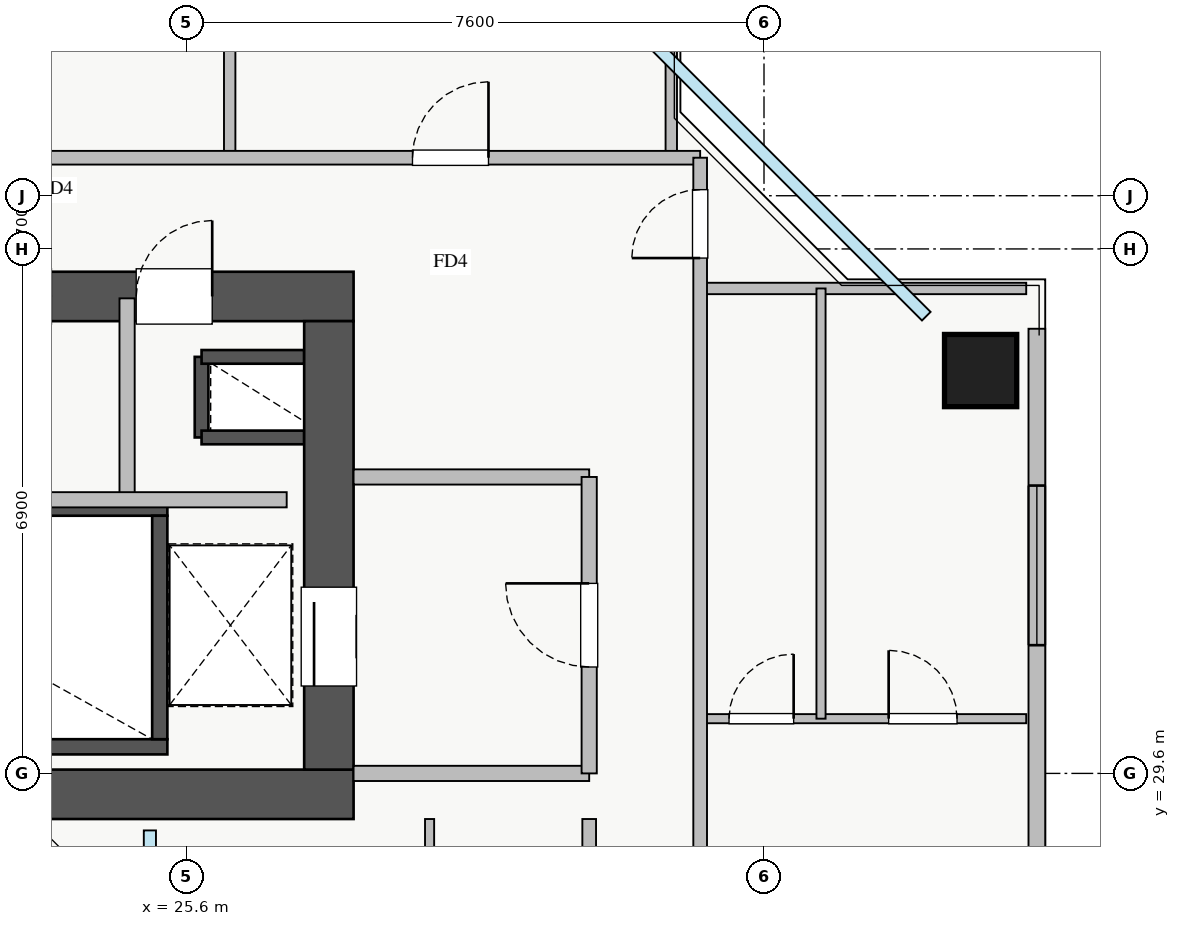
"""IFC4 building model, lengths in metres.
Left out: names, types, materials, properties, quantities, classifications, styles, units other than length and angle.
Written with IfcOpenShell. Run it as: python <this file> out.ifc"""

import sys

from ifc_helpers import new_model, si_unit, direction, frame, frame_2d, origin, origin_2d, place, context, subcontext, project, spatial, rectangle, extrude, source, transform, mapped, element, fill, save


model = new_model("IFC4")
c1 = context("Model", 3, precision=1e-05, world=origin(), true_north=direction((0.0, 1.0)))
c2 = subcontext(c1, "Body", "Model", "MODEL_VIEW")
j1 = project(units=[si_unit("LENGTHUNIT", "METRE"), si_unit("PLANEANGLEUNIT", "RADIAN")], contexts=[c1])
p1 = place(None, origin())
s1 = spatial("IfcSite", under=j1, at=p1, CompositionType="ELEMENT")
p2 = place(p1, origin())
s2 = spatial("IfcBuilding", under=s1, at=p2, CompositionType="ELEMENT")
p3 = place(p2, frame((0.0, 0.0, 147.0)))
s3 = spatial("IfcBuildingStorey", under=s2, at=p3, CompositionType="ELEMENT", Elevation=147.0)
p4 = place(p3, frame((25.8, 34.02, 0.0), z_axis=(0.0, 0.0, 1.0), x_axis=(0.0, 1.0, 0.0)))
e1 = element("IfcWall", 1, at=p4, inside=s3, PredefinedType="SHEAR", context=c2, shape_type="SweptSolid", body=[
    extrude(rectangle(XDim=1.06, YDim=0.18, at=frame_2d((0.53, 0.0))), origin(), (0.0, 0.0, 1.0), 3.07),
])
for number, where, z_axis, x_axis in (
    (2, (25.8, 35.08, 0.0), (0.0, 0.0, 1.0), (1.0, 0.0, 0.0)),
    (3, (25.8, 34.02, 0.0), (0.0, 0.0, 1.0), (1.0, 0.0, 0.0)),
):
    element("IfcWall", number, at=place(p3, frame(where, z_axis=z_axis, x_axis=x_axis)), inside=s3, PredefinedType="SHEAR", context=c2, shape_type="SweptSolid", body=[
        extrude(rectangle(XDim=1.35, YDim=0.18, at=frame_2d((0.675, 0.0))), origin(), (0.0, 0.0, 1.0), 3.07),
    ])
p5 = place(p3, frame((18.2, 29.95, 0.0), z_axis=(0.0, 0.0, 1.0), x_axis=(1.0, 0.0, 0.0)))
e4 = element("IfcWall", 4, at=p5, inside=s3, PredefinedType="SHEAR", context=c2, shape_type="SweptSolid", body=[
    extrude(rectangle(XDim=7.15, YDim=0.2, at=frame_2d((3.575, 0.0))), origin(), (0.0, 0.0, 1.0), 3.25),
])
p6 = place(p3, frame((18.2, 33.09, 0.0), z_axis=(0.0, 0.0, 1.0), x_axis=(1.0, 0.0, 0.0)))
e5 = element("IfcWall", 5, at=p6, inside=s3, PredefinedType="SHEAR", context=c2, shape_type="SweptSolid", body=[
    extrude(rectangle(XDim=7.15, YDim=0.2, at=frame_2d((3.575, 0.0))), origin(), (0.0, 0.0, 1.0), 3.25),
])
p7 = place(p6, frame((0.35, 0.0, 0.0)))
e6 = element("IfcOpeningElement", 6, at=p7, cuts=e5, PredefinedType="OPENING", context=c2, shape_type="SweptSolid", body=[
    extrude(rectangle(XDim=1.1, YDim=2.05, at=frame_2d((0.55, 1.025))), frame((0.0, 0.11, 0.0), z_axis=(0.0, -1.0, 0.0), x_axis=(1.0, 0.0, 0.0)), (0.0, 0.0, 1.0), 0.22),
])
p8 = place(p3, frame((25.25, 30.05, 0.0), z_axis=(0.0, 0.0, 1.0), x_axis=(0.0, 1.0, 0.0)))
e7 = element("IfcWall", 7, at=p8, inside=s3, PredefinedType="SHEAR", context=c2, shape_type="SweptSolid", body=[
    extrude(rectangle(XDim=2.94, YDim=0.2, at=frame_2d((1.47, 0.0))), origin(), (0.0, 0.0, 1.0), 3.25),
])
p9 = place(p3, frame((10.2, 29.325, 0.0), z_axis=(0.0, 0.0, 1.0), x_axis=(1.0, 0.0, 0.0)))
e8 = element("IfcWall", 8, at=p9, inside=s3, PredefinedType="SHEAR", context=c2, shape_type="SweptSolid", body=[
    extrude(rectangle(XDim=17.6, YDim=0.65, at=frame_2d((8.8, 0.0))), origin(), (0.0, 0.0, 1.0), 3.25),
])
p10 = place(p3, frame((10.2, 35.875, 0.0), z_axis=(0.0, 0.0, 1.0), x_axis=(1.0, 0.0, 0.0)))
e9 = element("IfcWall", 9, at=p10, inside=s3, PredefinedType="SHEAR", context=c2, shape_type="SweptSolid", body=[
    extrude(rectangle(XDim=17.6, YDim=0.65, at=frame_2d((8.8, 0.0))), origin(), (0.0, 0.0, 1.0), 3.25),
])
p11 = place(p10, frame((1.15, 0.0, 0.0)))
e10 = element("IfcOpeningElement", 10, at=p11, cuts=e9, PredefinedType="OPENING", context=c2, shape_type="SweptSolid", body=[
    extrude(rectangle(XDim=1.1, YDim=2.05, at=frame_2d((0.55, 1.025))), frame((0.0, 0.335, 0.0), z_axis=(0.0, -1.0, 0.0), x_axis=(1.0, 0.0, 0.0)), (0.0, 0.0, 1.0), 0.67),
])
p12 = place(p10, frame((8.3, 0.0, 0.0)))
e11 = element("IfcOpeningElement", 11, at=p12, cuts=e9, PredefinedType="OPENING", context=c2, shape_type="SweptSolid", body=[
    extrude(rectangle(XDim=1.1, YDim=2.05, at=frame_2d((0.55, 1.025))), frame((0.0, 0.335, 0.0), z_axis=(0.0, -1.0, 0.0), x_axis=(1.0, 0.0, 0.0)), (0.0, 0.0, 1.0), 0.67),
])
p13 = place(p10, frame((4.9, 0.0, 0.0)))
e12 = element("IfcOpeningElement", 12, at=p13, cuts=e9, PredefinedType="OPENING", context=c2, shape_type="SweptSolid", body=[
    extrude(rectangle(XDim=1.1, YDim=2.05, at=frame_2d((0.55, 1.025))), frame((0.0, 0.335, 0.0), z_axis=(0.0, -1.0, 0.0), x_axis=(1.0, 0.0, 0.0)), (0.0, 0.0, 1.0), 0.67),
])
p14 = place(p10, frame((14.74, 0.0, 0.0)))
e13 = element("IfcOpeningElement", 13, at=p14, cuts=e9, PredefinedType="OPENING", context=c2, shape_type="SweptSolid", body=[
    extrude(rectangle(XDim=1.0, YDim=2.05, at=frame_2d((0.5, 1.025))), frame((0.0, 0.335, 0.0), z_axis=(0.0, -1.0, 0.0), x_axis=(1.0, 0.0, 0.0)), (0.0, 0.0, 1.0), 0.67),
])
p15 = place(p10, frame((10.175, 0.0, 0.0)))
e14 = element("IfcOpeningElement", 14, at=p15, cuts=e9, PredefinedType="OPENING", context=c2, shape_type="SweptSolid", body=[
    extrude(rectangle(XDim=1.0, YDim=2.05, at=frame_2d((0.5, 1.025))), frame((0.0, 0.335, 0.0), z_axis=(0.0, -1.0, 0.0), x_axis=(1.0, 0.0, 0.0)), (0.0, 0.0, 1.0), 0.67),
])
p16 = place(p10, frame((12.625, 0.0, 0.0)))
e15 = element("IfcOpeningElement", 15, at=p16, cuts=e9, PredefinedType="OPENING", context=c2, shape_type="SweptSolid", body=[
    extrude(rectangle(XDim=1.0, YDim=2.05, at=frame_2d((0.5, 1.025))), frame((0.0, 0.335, 0.0), z_axis=(0.0, -1.0, 0.0), x_axis=(1.0, 0.0, 0.0)), (0.0, 0.0, 1.0), 0.67),
])
p17 = place(p3, frame((27.475, 29.65, 0.0), z_axis=(0.0, 0.0, 1.0), x_axis=(0.0, 1.0, 0.0)))
e16 = element("IfcWall", 16, at=p17, inside=s3, PredefinedType="SHEAR", context=c2, shape_type="SweptSolid", body=[
    extrude(rectangle(XDim=5.9, YDim=0.65, at=frame_2d((2.95, 0.0))), origin(), (0.0, 0.0, 1.0), 3.25),
])
p18 = place(p17, frame((1.1, 0.0, 0.0)))
e17 = element("IfcOpeningElement", 17, at=p18, cuts=e16, PredefinedType="OPENING", context=c2, shape_type="SweptSolid", body=[
    extrude(rectangle(XDim=1.3, YDim=2.05, at=frame_2d((0.65, 1.025))), frame((0.0, 0.335, 0.0), z_axis=(0.0, -1.0, 0.0), x_axis=(1.0, 0.0, 0.0)), (0.0, 0.0, 1.0), 0.67),
])
m1 = source(origin(), c2, "Body", "SweptSolid", [
    extrude(rectangle(XDim=0.95, YDim=0.95, at=origin_2d()), origin(), (0.0, 0.0, 1.0), 3.25),
])
p19 = place(p3, frame((36.05, 34.9, 0.0), z_axis=(0.0, 0.0, 1.0), x_axis=(1.0, 0.0, 0.0)))
e18 = element("IfcColumn", 18, at=p19, inside=s3, PredefinedType="COLUMN", context=c2, shape_type="MappedRepresentation", body=[
    mapped(m1, transform((0.0, 0.0, 0.0), x_axis=(1.0, 0.0, 0.0), y_axis=(0.0, 1.0, 0.0), z_axis=(0.0, 0.0, 1.0), scale=1.0)),
])
p20 = place(p3, frame((36.79, 10.55, 0.0), z_axis=(0.0, 0.0, 1.0), x_axis=(0.0, 1.0, 0.0)))
e19 = element("IfcWall", 19, at=p20, inside=s3, PredefinedType="STANDARD", context=c2, shape_type="SweptSolid", body=[
    extrude(rectangle(XDim=24.9, YDim=0.22, at=frame_2d((12.45, 0.0))), origin(), (0.0, 0.0, 1.0), 2.61),
])
p21 = place(p20, frame((13.3, 0.0, 0.0)))
e20 = element("IfcOpeningElement", 20, at=p21, cuts=e19, PredefinedType="OPENING", context=c2, shape_type="SweptSolid", body=[
    extrude(rectangle(XDim=1.2, YDim=2.1, at=frame_2d((0.6, 1.05))), frame((0.0, 0.12, 0.0), z_axis=(0.0, -1.0, 0.0), x_axis=(1.0, 0.0, 0.0)), (0.0, 0.0, 1.0), 0.24),
])
p22 = place(p20, frame((1.912, 0.0, 0.9)))
e21 = element("IfcOpeningElement", 21, at=p22, cuts=e19, PredefinedType="OPENING", context=c2, shape_type="SweptSolid", body=[
    extrude(rectangle(XDim=2.4, YDim=1.48, at=frame_2d((1.2, 0.74))), frame((0.0, 0.12, 0.0), z_axis=(0.0, -1.0, 0.0), x_axis=(1.0, 0.0, 0.0)), (0.0, 0.0, 1.0), 0.24),
])
p23 = place(p20, frame((20.737, 0.0, 0.9)))
e22 = element("IfcOpeningElement", 22, at=p23, cuts=e19, PredefinedType="OPENING", context=c2, shape_type="SweptSolid", body=[
    extrude(rectangle(XDim=2.1, YDim=1.48, at=frame_2d((1.05, 0.74))), frame((0.0, 0.12, 0.0), z_axis=(0.0, -1.0, 0.0), x_axis=(1.0, 0.0, 0.0)), (0.0, 0.0, 1.0), 0.24),
])
p24 = place(p20, frame((14.72, 0.0, 0.9)))
e23 = element("IfcOpeningElement", 23, at=p24, cuts=e19, PredefinedType="OPENING", context=c2, shape_type="SweptSolid", body=[
    extrude(rectangle(XDim=0.9, YDim=1.2, at=frame_2d((0.45, 0.6))), frame((0.0, 0.12, 0.0), z_axis=(0.0, -1.0, 0.0), x_axis=(1.0, 0.0, 0.0)), (0.0, 0.0, 1.0), 0.24),
])
for number, where, z_axis, x_axis in (
    (24, (27.8, 29.6, 0.0), (0.0, 0.0, 1.0), (1.0, 0.0, 0.0)),
    (25, (27.8, 33.5, 0.0), (0.0, 0.0, 1.0), (1.0, 0.0, 0.0)),
):
    element("IfcWall", number, at=place(p3, frame(where, z_axis=z_axis, x_axis=x_axis)), inside=s3, PredefinedType="PARTITIONING", context=c2, shape_type="SweptSolid", body=[
        extrude(rectangle(XDim=3.1, YDim=0.2, at=frame_2d((1.55, 0.0))), origin(), (0.0, 0.0, 1.0), 3.07),
    ])
p25 = place(p3, frame((30.9, 29.6, 0.0), z_axis=(0.0, 0.0, 1.0), x_axis=(0.0, 1.0, 0.0)))
e26 = element("IfcWall", 26, at=p25, inside=s3, PredefinedType="PARTITIONING", context=c2, shape_type="SweptSolid", body=[
    extrude(rectangle(XDim=3.9, YDim=0.2, at=frame_2d((1.95, 0.0))), origin(), (0.0, 0.0, 1.0), 3.07),
])
p26 = place(p25, frame((1.4, 0.0, 0.0)))
e27 = element("IfcOpeningElement", 27, at=p26, cuts=e26, PredefinedType="OPENING", context=c2, shape_type="SweptSolid", body=[
    extrude(rectangle(XDim=1.1, YDim=2.05, at=frame_2d((0.55, 1.025))), frame((0.0, 0.11, 0.0), z_axis=(0.0, -1.0, 0.0), x_axis=(1.0, 0.0, 0.0)), (0.0, 0.0, 1.0), 0.22),
])
p27 = place(p3, frame((24.82, 33.2, 0.0), z_axis=(0.0, 0.0, 1.0), x_axis=(0.0, 1.0, 0.0)))
e28 = element("IfcWall", 28, at=p27, inside=s3, PredefinedType="PARTITIONING", context=c2, shape_type="SweptSolid", body=[
    extrude(rectangle(XDim=2.65, YDim=0.2, at=frame_2d((1.325, 0.0))), origin(), (0.0, 0.0, 1.0), 3.07),
])
p28 = place(p3, frame((21.75, 33.2, 0.0), z_axis=(0.0, 0.0, 1.0), x_axis=(1.0, 0.0, 0.0)))
e29 = element("IfcWall", 29, at=p28, inside=s3, PredefinedType="PARTITIONING", context=c2, shape_type="SweptSolid", body=[
    extrude(rectangle(XDim=5.17, YDim=0.2, at=frame_2d((2.585, 0.0))), origin(), (0.0, 0.0, 1.0), 3.07),
])
for number, where, z_axis, x_axis in (
    (30, (26.17, 37.7, 0.0), (0.0, 0.0, 1.0), (0.0, 1.0, 0.0)),
    (31, (31.98, 37.7, 0.0), (0.0, 0.0, 1.0), (0.0, 1.0, 0.0)),
):
    element("IfcWall", number, at=place(p3, frame(where, z_axis=z_axis, x_axis=x_axis)), inside=s3, PredefinedType="PARTITIONING", context=c2, shape_type="SweptSolid", body=[
        extrude(rectangle(XDim=2.95, YDim=0.15, at=frame_2d((1.475, 0.0))), origin(), (0.0, 0.0, 1.0), 3.07),
    ])
p29 = place(p3, frame((8.75, 37.7, 0.0), z_axis=(0.0, 0.0, 1.0), x_axis=(1.0, 0.0, 0.0)))
e32 = element("IfcWall", 32, at=p29, inside=s3, PredefinedType="PARTITIONING", context=c2, shape_type="SweptSolid", body=[
    extrude(rectangle(XDim=23.61, YDim=0.18, at=frame_2d((11.805, 0.0))), origin(), (0.0, 0.0, 1.0), 3.07),
])
p30 = place(p29, frame((2.795, 0.0, 0.0)))
e33 = element("IfcOpeningElement", 33, at=p30, cuts=e32, PredefinedType="OPENING", context=c2, shape_type="SweptSolid", body=[
    extrude(rectangle(XDim=1.0, YDim=2.05, at=frame_2d((0.5, 1.025))), frame((0.0, 0.1, 0.0), z_axis=(0.0, -1.0, 0.0), x_axis=(1.0, 0.0, 0.0)), (0.0, 0.0, 1.0), 0.2),
])
p31 = place(p29, frame((7.97, 0.0, 0.0)))
e34 = element("IfcOpeningElement", 34, at=p31, cuts=e32, PredefinedType="OPENING", context=c2, shape_type="SweptSolid", body=[
    extrude(rectangle(XDim=1.0, YDim=2.05, at=frame_2d((0.5, 1.025))), frame((0.0, 0.1, 0.0), z_axis=(0.0, -1.0, 0.0), x_axis=(1.0, 0.0, 0.0)), (0.0, 0.0, 1.0), 0.2),
])
p32 = place(p29, frame((13.385, 0.0, 0.0)))
e35 = element("IfcOpeningElement", 35, at=p32, cuts=e32, PredefinedType="OPENING", context=c2, shape_type="SweptSolid", body=[
    extrude(rectangle(XDim=1.0, YDim=2.05, at=frame_2d((0.5, 1.025))), frame((0.0, 0.1, 0.0), z_axis=(0.0, -1.0, 0.0), x_axis=(1.0, 0.0, 0.0)), (0.0, 0.0, 1.0), 0.2),
])
p33 = place(p29, frame((19.825, 0.0, 0.0)))
e36 = element("IfcOpeningElement", 36, at=p33, cuts=e32, PredefinedType="OPENING", context=c2, shape_type="SweptSolid", body=[
    extrude(rectangle(XDim=1.0, YDim=2.05, at=frame_2d((0.5, 1.025))), frame((0.0, 0.1, 0.0), z_axis=(0.0, -1.0, 0.0), x_axis=(1.0, 0.0, 0.0)), (0.0, 0.0, 1.0), 0.2),
])
p34 = place(p3, frame((32.36, 35.98, 0.0), z_axis=(0.0, 0.0, 1.0), x_axis=(1.0, 0.0, 0.0)))
e37 = element("IfcWall", 37, at=p34, inside=s3, PredefinedType="PARTITIONING", context=c2, shape_type="SweptSolid", body=[
    extrude(rectangle(XDim=4.29, YDim=0.15, at=frame_2d((2.145, 0.0))), origin(), (0.0, 0.0, 1.0), 3.07),
])
p35 = place(p3, frame((32.36, 30.32, 0.0), z_axis=(0.0, 0.0, 1.0), x_axis=(1.0, 0.0, 0.0)))
e38 = element("IfcWall", 38, at=p35, inside=s3, PredefinedType="PLUMBINGWALL", context=c2, shape_type="SweptSolid", body=[
    extrude(rectangle(XDim=4.29, YDim=0.12, at=frame_2d((2.145, 0.0))), origin(), (0.0, 0.0, 1.0), 3.07),
])
p36 = place(p35, frame((0.38, 0.0, 0.0)))
e39 = element("IfcOpeningElement", 39, at=p36, cuts=e38, PredefinedType="OPENING", context=c2, shape_type="SweptSolid", body=[
    extrude(rectangle(XDim=0.85, YDim=2.05, at=frame_2d((0.425, 1.025))), frame((0.0, 0.07, 0.0), z_axis=(0.0, -1.0, 0.0), x_axis=(1.0, 0.0, 0.0)), (0.0, 0.0, 1.0), 0.14),
])
p37 = place(p35, frame((2.48, 0.0, 0.0)))
e40 = element("IfcOpeningElement", 40, at=p37, cuts=e38, PredefinedType="OPENING", context=c2, shape_type="SweptSolid", body=[
    extrude(rectangle(XDim=0.9, YDim=2.05, at=frame_2d((0.45, 1.025))), frame((0.0, 0.07, 0.0), z_axis=(0.0, -1.0, 0.0), x_axis=(1.0, 0.0, 0.0)), (0.0, 0.0, 1.0), 0.14),
])
p38 = place(p3, frame((33.95, 30.32, 0.0), z_axis=(0.0, 0.0, 1.0), x_axis=(0.0, 1.0, 0.0)))
e41 = element("IfcWall", 41, at=p38, inside=s3, PredefinedType="PLUMBINGWALL", context=c2, shape_type="SweptSolid", body=[
    extrude(rectangle(XDim=5.66, YDim=0.12, at=frame_2d((2.83, 0.0))), origin(), (0.0, 0.0, 1.0), 3.07),
])
p39 = place(p3, frame((32.36, 8.3, 0.0), z_axis=(0.0, 0.0, 1.0), x_axis=(0.0, 1.0, 0.0)))
e42 = element("IfcWall", 42, at=p39, inside=s3, PredefinedType="PARTITIONING", context=c2, shape_type="SweptSolid", body=[
    extrude(rectangle(XDim=29.4, YDim=0.18, at=frame_2d((14.7, 0.0))), origin(), (0.0, 0.0, 1.0), 3.07),
])
p40 = place(p39, frame((28.08, 0.0, 0.0)))
e43 = element("IfcOpeningElement", 43, at=p40, cuts=e42, PredefinedType="OPENING", context=c2, shape_type="SweptSolid", body=[
    extrude(rectangle(XDim=0.9, YDim=2.05, at=frame_2d((0.45, 1.025))), frame((0.0, 0.1, 0.0), z_axis=(0.0, -1.0, 0.0), x_axis=(1.0, 0.0, 0.0)), (0.0, 0.0, 1.0), 0.2),
])
p41 = place(p39, frame((0.42, 0.0, 0.0)))
e44 = element("IfcOpeningElement", 44, at=p41, cuts=e42, PredefinedType="OPENING", context=c2, shape_type="SweptSolid", body=[
    extrude(rectangle(XDim=0.9, YDim=2.05, at=frame_2d((0.45, 1.025))), frame((0.0, 0.1, 0.0), z_axis=(0.0, -1.0, 0.0), x_axis=(1.0, 0.0, 0.0)), (0.0, 0.0, 1.0), 0.2),
])
p42 = place(p39, frame((8.05, 0.0, 0.0)))
e45 = element("IfcOpeningElement", 45, at=p42, cuts=e42, PredefinedType="OPENING", context=c2, shape_type="SweptSolid", body=[
    extrude(rectangle(XDim=1.0, YDim=2.05, at=frame_2d((0.5, 1.025))), frame((0.0, 0.1, 0.0), z_axis=(0.0, -1.0, 0.0), x_axis=(1.0, 0.0, 0.0)), (0.0, 0.0, 1.0), 0.2),
])
p43 = place(p39, frame((18.01, 0.0, 0.0)))
e46 = element("IfcOpeningElement", 46, at=p43, cuts=e42, PredefinedType="OPENING", context=c2, shape_type="SweptSolid", body=[
    extrude(rectangle(XDim=1.0, YDim=2.05, at=frame_2d((0.5, 1.025))), frame((0.0, 0.1, 0.0), z_axis=(0.0, -1.0, 0.0), x_axis=(1.0, 0.0, 0.0)), (0.0, 0.0, 1.0), 0.2),
])
p44 = place(p3, frame((28.8, 23.1, 0.0), z_axis=(0.0, 0.0, 1.0), x_axis=(0.0, 1.0, 0.0)))
e47 = element("IfcWall", 47, at=p44, inside=s3, PredefinedType="PLUMBINGWALL", context=c2, shape_type="SweptSolid", body=[
    extrude(rectangle(XDim=5.9, YDim=0.12, at=frame_2d((2.95, 0.0))), origin(), (0.0, 0.0, 1.0), 3.07),
])
p45 = place(p3, frame((30.9, 17.0, 0.0), z_axis=(0.0, 0.0, 1.0), x_axis=(0.0, 1.0, 0.0)))
e48 = element("IfcWall", 48, at=p45, inside=s3, PredefinedType="PARTITIONING", context=c2, shape_type="SweptSolid", body=[
    extrude(rectangle(XDim=12.0, YDim=0.18, at=frame_2d((6.0, 0.0))), origin(), (0.0, 0.0, 1.0), 3.07),
])
p46 = place(p45, frame((2.36, 0.0, 0.0)))
e49 = element("IfcOpeningElement", 49, at=p46, cuts=e48, PredefinedType="OPENING", context=c2, shape_type="SweptSolid", body=[
    extrude(rectangle(XDim=1.0, YDim=2.05, at=frame_2d((0.5, 1.025))), frame((0.0, 0.1, 0.0), z_axis=(0.0, -1.0, 0.0), x_axis=(1.0, 0.0, 0.0)), (0.0, 0.0, 1.0), 0.2),
])
m2 = source(origin(), c2, "Body", "SweptSolid", [
    extrude(rectangle(XDim=2.1, YDim=1.48, at=frame_2d((1.05, 0.74))), frame((0.0, 0.03, 0.0), z_axis=(0.0, -1.0, 0.0), x_axis=(1.0, 0.0, 0.0)), (0.0, 0.0, 1.0), 0.06),
])
p47 = place(p23, origin())
e50 = element("IfcWindow", 50, at=p47, inside=s3, PartitioningType="TRIPLE_PANEL_VERTICAL", PredefinedType="WINDOW", context=c2, shape_type="MappedRepresentation", body=[
    mapped(m2, transform((0.0, 0.0, 0.0), x_axis=(1.0, 0.0, 0.0), y_axis=(0.0, 1.0, 0.0), z_axis=(0.0, 0.0, 1.0), scale=1.0)),
])
fill(e22, e50)
m3 = source(origin(), c2, "Body", "SweptSolid", [
    extrude(rectangle(XDim=1.3, YDim=2.05, at=frame_2d((0.65, 1.025))), frame((0.0, 0.025, 0.0), z_axis=(0.0, -1.0, 0.0), x_axis=(1.0, 0.0, 0.0)), (0.0, 0.0, 1.0), 0.05),
])
p48 = place(p18, origin())
e51 = element("IfcDoor", 51, at=p48, inside=s3, OperationType="SLIDING_TO_LEFT", PredefinedType="DOOR", context=c2, shape_type="MappedRepresentation", body=[
    mapped(m3, transform((0.0, 0.0, 0.0), x_axis=(1.0, 0.0, 0.0), y_axis=(0.0, 1.0, 0.0), z_axis=(0.0, 0.0, 1.0), scale=1.0)),
])
fill(e17, e51)
m4 = source(origin(), c2, "Body", "SweptSolid", [
    extrude(rectangle(XDim=1.0, YDim=2.05, at=frame_2d((0.5, 1.025))), frame((0.0, 0.025, 0.0), z_axis=(0.0, -1.0, 0.0), x_axis=(1.0, 0.0, 0.0)), (0.0, 0.0, 1.0), 0.05),
])
p49 = place(p14, origin())
e52 = element("IfcDoor", 52, at=p49, inside=s3, OperationType="SINGLE_SWING_RIGHT", PredefinedType="DOOR", context=c2, shape_type="MappedRepresentation", body=[
    mapped(m4, transform((0.0, 0.0, 0.0), x_axis=(1.0, 0.0, 0.0), y_axis=(0.0, 1.0, 0.0), z_axis=(0.0, 0.0, 1.0), scale=1.0)),
])
fill(e13, e52)
m5 = source(origin(), c2, "Body", "SweptSolid", [
    extrude(rectangle(XDim=1.1, YDim=2.05, at=frame_2d((0.55, 1.025))), frame((0.0, 0.025, 0.0), z_axis=(0.0, -1.0, 0.0), x_axis=(1.0, 0.0, 0.0)), (0.0, 0.0, 1.0), 0.05),
])
p50 = place(p26, origin())
e53 = element("IfcDoor", 53, at=p50, inside=s3, OperationType="SINGLE_SWING_RIGHT", PredefinedType="DOOR", context=c2, shape_type="MappedRepresentation", body=[
    mapped(m5, transform((0.0, 0.0, 0.0), x_axis=(1.0, 0.0, 0.0), y_axis=(0.0, 1.0, 0.0), z_axis=(0.0, 0.0, 1.0), scale=1.0)),
])
fill(e27, e53)
p51 = place(p33, origin())
e54 = element("IfcDoor", 54, at=p51, inside=s3, OperationType="SINGLE_SWING_RIGHT", PredefinedType="DOOR", context=c2, shape_type="MappedRepresentation", body=[
    mapped(m4, transform((0.0, 0.0, 0.0), x_axis=(1.0, 0.0, 0.0), y_axis=(0.0, 1.0, 0.0), z_axis=(0.0, 0.0, 1.0), scale=1.0)),
])
fill(e36, e54)
m6 = source(origin(), c2, "Body", "SweptSolid", [
    extrude(rectangle(XDim=0.85, YDim=2.05, at=frame_2d((0.425, 1.025))), frame((0.0, 0.025, 0.0), z_axis=(0.0, -1.0, 0.0), x_axis=(1.0, 0.0, 0.0)), (0.0, 0.0, 1.0), 0.05),
])
p52 = place(p36, origin())
e55 = element("IfcDoor", 55, at=p52, inside=s3, OperationType="SINGLE_SWING_RIGHT", PredefinedType="DOOR", context=c2, shape_type="MappedRepresentation", body=[
    mapped(m6, transform((0.0, 0.0, 0.0), x_axis=(1.0, 0.0, 0.0), y_axis=(0.0, 1.0, 0.0), z_axis=(0.0, 0.0, 1.0), scale=1.0)),
])
fill(e39, e55)
m7 = source(origin(), c2, "Body", "SweptSolid", [
    extrude(rectangle(XDim=0.9, YDim=2.05, at=frame_2d((0.45, 1.025))), frame((0.0, 0.025, 0.0), z_axis=(0.0, -1.0, 0.0), x_axis=(1.0, 0.0, 0.0)), (0.0, 0.0, 1.0), 0.05),
])
p53 = place(p37, origin())
e56 = element("IfcDoor", 56, at=p53, inside=s3, OperationType="SINGLE_SWING_LEFT", PredefinedType="DOOR", context=c2, shape_type="MappedRepresentation", body=[
    mapped(m7, transform((0.0, 0.0, 0.0), x_axis=(1.0, 0.0, 0.0), y_axis=(0.0, 1.0, 0.0), z_axis=(0.0, 0.0, 1.0), scale=1.0)),
])
fill(e40, e56)
p54 = place(p40, origin())
e57 = element("IfcDoor", 57, at=p54, inside=s3, OperationType="SINGLE_SWING_LEFT", PredefinedType="DOOR", context=c2, shape_type="MappedRepresentation", body=[
    mapped(m7, transform((0.0, 0.0, 0.0), x_axis=(1.0, 0.0, 0.0), y_axis=(0.0, 1.0, 0.0), z_axis=(0.0, 0.0, 1.0), scale=1.0)),
])
fill(e43, e57)
save(model, sys.argv[1])
